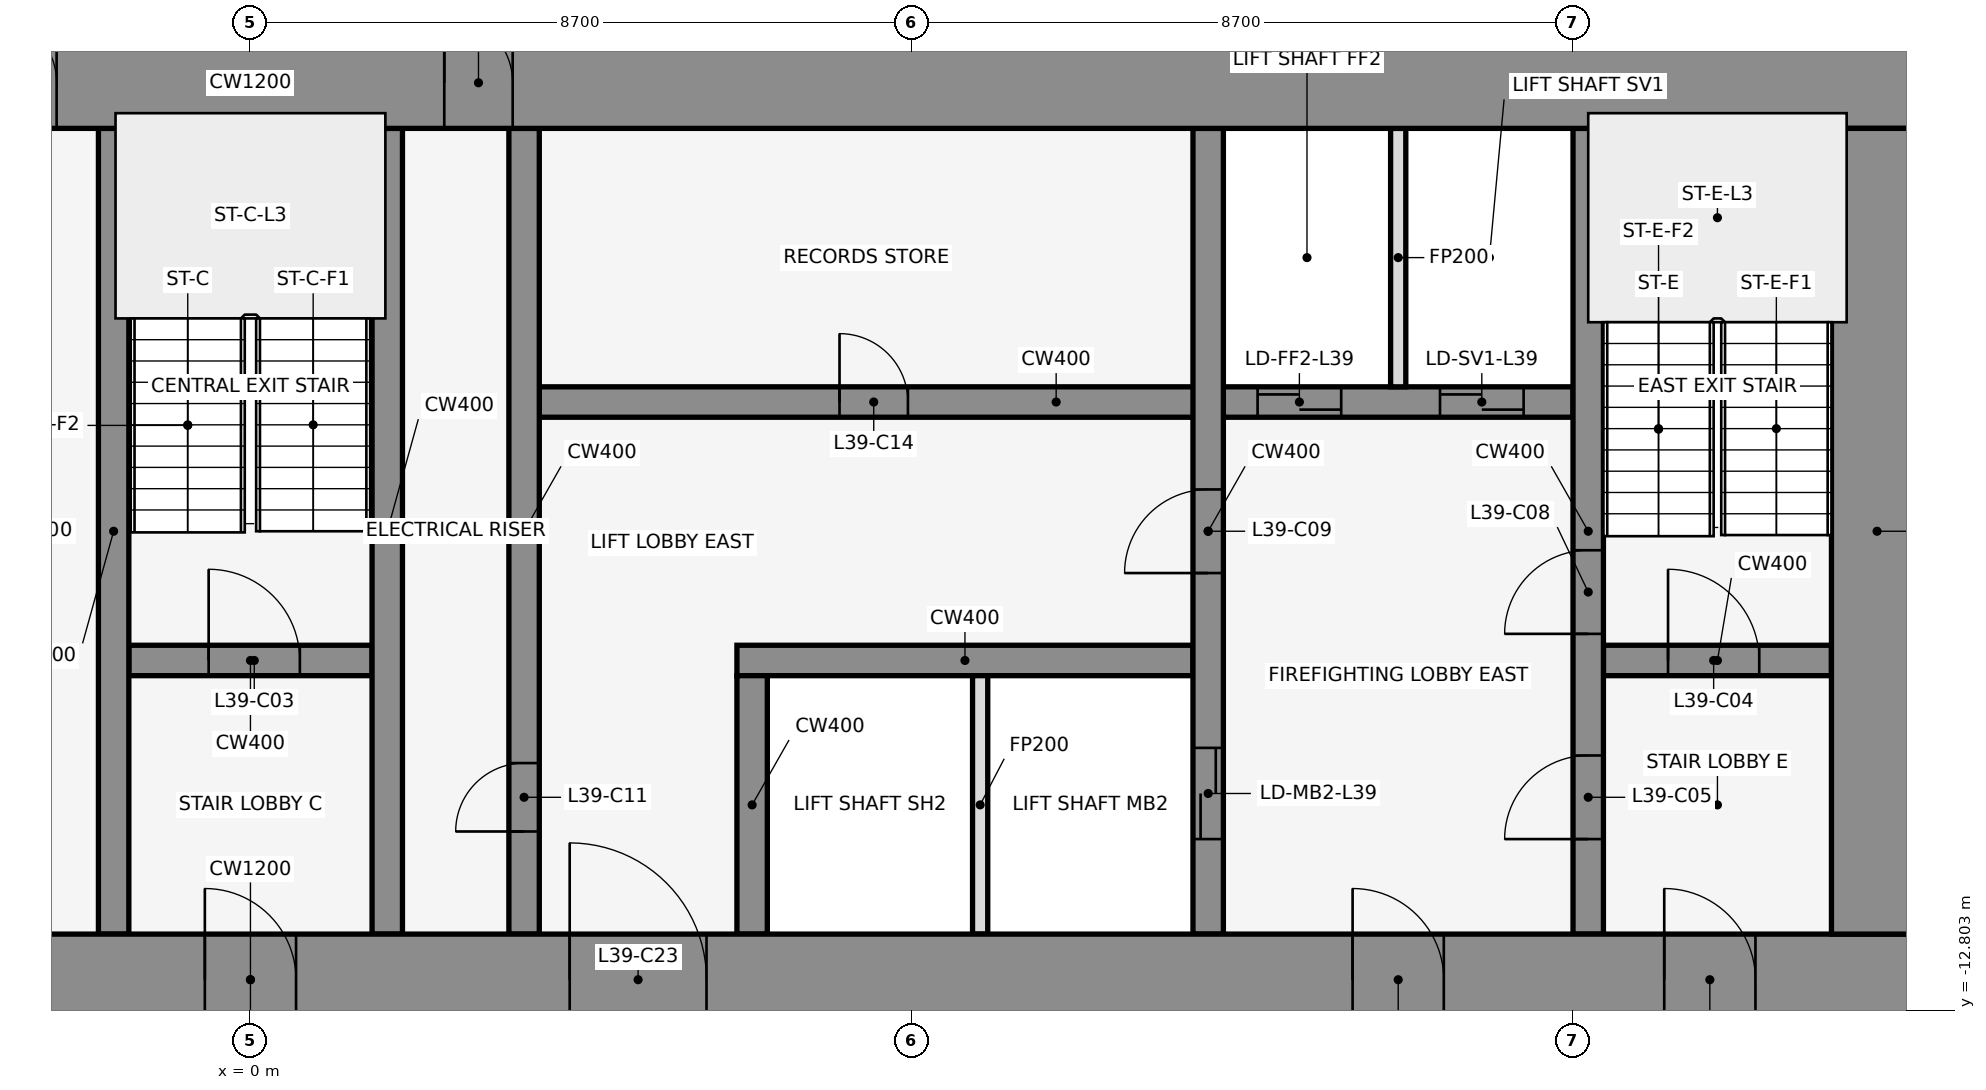
"""IFC4 building model, lengths in metres.
Left out: names, types, materials, properties, quantities, classifications, styles, units other than length and angle.
Written with IfcOpenShell. Run it as: python <this file> out.ifc"""

import sys

from ifc_helpers import new_model, si_unit, direction, frame, frame_2d, origin, place, context, subcontext, project, spatial, rectangle, extrude, element, fill, save


model = new_model("IFC4")
c1 = context("Model", 3, precision=1e-05, world=origin(), true_north=direction((0.0, 1.0)))
c2 = subcontext(c1, "Body", "Model", "MODEL_VIEW")
j1 = project(units=[si_unit("LENGTHUNIT", "METRE"), si_unit("PLANEANGLEUNIT", "RADIAN")], contexts=[c1])
p1 = place(None, origin())
s1 = spatial("IfcSite", under=j1, at=p1, CompositionType="ELEMENT")
p2 = place(p1, origin())
s2 = spatial("IfcBuilding", under=s1, at=p2, CompositionType="ELEMENT")
p3 = place(p2, frame((0.0, 0.0, 177.3)))
s3 = spatial("IfcBuildingStorey", under=s2, at=p3, CompositionType="ELEMENT", Elevation=177.3)
for number, where, z_axis, x_axis in (
    (1, (16.432, -0.105, 0.0), (0.0, 0.0, 1.0), (-0.84, 0.543, 0.0)),
    (2, (1.901, 1.08, 0.0), (0.0, 0.0, 1.0), (-0.84, -0.543, 0.0)),
    (3, (-0.068, -0.105, 0.0), (0.0, 0.0, 1.0), (-0.84, 0.543, 0.0)),
):
    element("IfcWall", number, at=place(p3, frame(where, z_axis=z_axis, x_axis=x_axis)), inside=s3, PredefinedType="STANDARD", context=c2, shape_type="SweptSolid", body=[
        extrude(rectangle(XDim=2.183, YDim=0.25, at=frame_2d((1.091, 0.0))), origin(), (0.0, 0.0, 1.0), 3.95),
    ])
p4 = place(p3, frame((-1.6, -8.2, 0.0), z_axis=(0.0, 0.0, 1.0), x_axis=(1.0, 0.0, 0.0)))
e4 = element("IfcWall", 4, at=p4, inside=s3, PredefinedType="SHEAR", context=c2, shape_type="SweptSolid", body=[
    extrude(rectangle(XDim=3.2, YDim=0.4, at=frame_2d((1.6, 0.0))), origin(), (0.0, 0.0, 1.0), 4.1),
])
p5 = place(p4, frame((1.05, 0.0, 0.0)))
e5 = element("IfcOpeningElement", 5, at=p5, cuts=e4, PredefinedType="OPENING", context=c2, shape_type="SweptSolid", body=[
    extrude(rectangle(XDim=1.2, YDim=2.1, at=frame_2d((0.6, 1.05))), frame((0.0, 0.212, 0.0), z_axis=(0.0, -1.0, 0.0), x_axis=(1.0, 0.0, 0.0)), (0.0, 0.0, 1.0), 0.424),
])
p6 = place(p3, frame((6.4, -8.2, 0.0), z_axis=(0.0, 0.0, 1.0), x_axis=(1.0, 0.0, 0.0)))
e6 = element("IfcWall", 6, at=p6, inside=s3, PredefinedType="SHEAR", context=c2, shape_type="SweptSolid", body=[
    extrude(rectangle(XDim=6.0, YDim=0.4, at=frame_2d((3.0, 0.0))), origin(), (0.0, 0.0, 1.0), 4.1),
])
p7 = place(p3, frame((17.8, -8.2, 0.0), z_axis=(0.0, 0.0, 1.0), x_axis=(1.0, 0.0, 0.0)))
e7 = element("IfcWall", 7, at=p7, inside=s3, PredefinedType="SHEAR", context=c2, shape_type="SweptSolid", body=[
    extrude(rectangle(XDim=3.0, YDim=0.4, at=frame_2d((1.5, 0.0))), origin(), (0.0, 0.0, 1.0), 4.1),
])
p8 = place(p7, frame((0.85, 0.0, 0.0)))
e8 = element("IfcOpeningElement", 8, at=p8, cuts=e7, PredefinedType="OPENING", context=c2, shape_type="SweptSolid", body=[
    extrude(rectangle(XDim=1.2, YDim=2.1, at=frame_2d((0.6, 1.05))), frame((0.0, 0.212, 0.0), z_axis=(0.0, -1.0, 0.0), x_axis=(1.0, 0.0, 0.0)), (0.0, 0.0, 1.0), 0.424),
])
p9 = place(p3, frame((3.8, -4.8, 0.0), z_axis=(0.0, 0.0, 1.0), x_axis=(1.0, 0.0, 0.0)))
e9 = element("IfcWall", 9, at=p9, inside=s3, PredefinedType="SHEAR", context=c2, shape_type="SweptSolid", body=[
    extrude(rectangle(XDim=13.6, YDim=0.4, at=frame_2d((6.8, 0.0))), origin(), (0.0, 0.0, 1.0), 4.1),
])
p10 = place(p9, frame((9.45, 0.0, 0.0)))
e10 = element("IfcOpeningElement", 10, at=p10, cuts=e9, PredefinedType="OPENING", context=c2, shape_type="SweptSolid", body=[
    extrude(rectangle(XDim=1.1, YDim=2.1, at=frame_2d((0.55, 1.05))), frame((0.0, 0.212, 0.0), z_axis=(0.0, -1.0, 0.0), x_axis=(1.0, 0.0, 0.0)), (0.0, 0.0, 1.0), 0.424),
])
p11 = place(p9, frame((11.85, 0.0, 0.0)))
e11 = element("IfcOpeningElement", 11, at=p11, cuts=e9, PredefinedType="OPENING", context=c2, shape_type="SweptSolid", body=[
    extrude(rectangle(XDim=1.1, YDim=2.1, at=frame_2d((0.55, 1.05))), frame((0.0, 0.212, 0.0), z_axis=(0.0, -1.0, 0.0), x_axis=(1.0, 0.0, 0.0)), (0.0, 0.0, 1.0), 0.424),
])
p12 = place(p9, frame((3.95, 0.0, 0.0)))
e12 = element("IfcOpeningElement", 12, at=p12, cuts=e9, PredefinedType="OPENING", context=c2, shape_type="SweptSolid", body=[
    extrude(rectangle(XDim=0.9, YDim=2.1, at=frame_2d((0.45, 1.05))), frame((0.0, 0.212, 0.0), z_axis=(0.0, -1.0, 0.0), x_axis=(1.0, 0.0, 0.0)), (0.0, 0.0, 1.0), 0.424),
])
for number, where, z_axis, x_axis in (
    (13, (-1.8, -11.8, 0.0), (0.0, 0.0, 1.0), (0.0, 1.0, 0.0)),
    (14, (1.8, -11.8, 0.0), (0.0, 0.0, 1.0), (0.0, 1.0, 0.0)),
):
    element("IfcWall", number, at=place(p3, frame(where, z_axis=z_axis, x_axis=x_axis)), inside=s3, PredefinedType="SHEAR", context=c2, shape_type="SweptSolid", body=[
        extrude(rectangle(XDim=10.6, YDim=0.4, at=frame_2d((5.3, 0.0))), origin(), (0.0, 0.0, 1.0), 4.1),
    ])
p13 = place(p3, frame((3.6, -11.8, 0.0), z_axis=(0.0, 0.0, 1.0), x_axis=(0.0, 1.0, 0.0)))
e15 = element("IfcWall", 15, at=p13, inside=s3, PredefinedType="SHEAR", context=c2, shape_type="SweptSolid", body=[
    extrude(rectangle(XDim=10.6, YDim=0.4, at=frame_2d((5.3, 0.0))), origin(), (0.0, 0.0, 1.0), 4.1),
])
p14 = place(p13, frame((1.35, 0.0, 0.0)))
e16 = element("IfcOpeningElement", 16, at=p14, cuts=e15, PredefinedType="OPENING", context=c2, shape_type="SweptSolid", body=[
    extrude(rectangle(XDim=0.9, YDim=2.1, at=frame_2d((0.45, 1.05))), frame((0.0, 0.212, 0.0), z_axis=(0.0, -1.0, 0.0), x_axis=(1.0, 0.0, 0.0)), (0.0, 0.0, 1.0), 0.424),
])
p15 = place(p3, frame((6.6, -11.8, 0.0), z_axis=(0.0, 0.0, 1.0), x_axis=(0.0, 1.0, 0.0)))
e17 = element("IfcWall", 17, at=p15, inside=s3, PredefinedType="SHEAR", context=c2, shape_type="SweptSolid", body=[
    extrude(rectangle(XDim=3.4, YDim=0.4, at=frame_2d((1.7, 0.0))), origin(), (0.0, 0.0, 1.0), 4.1),
])
p16 = place(p3, frame((9.6, -11.8, 0.0), z_axis=(0.0, 0.0, 1.0), x_axis=(0.0, 1.0, 0.0)))
e18 = element("IfcWall", 18, at=p16, inside=s3, PredefinedType="PARTITIONING", context=c2, shape_type="SweptSolid", body=[
    extrude(rectangle(XDim=3.4, YDim=0.2, at=frame_2d((1.7, 0.0))), origin(), (0.0, 0.0, 1.0), 2.84),
])
p17 = place(p3, frame((12.6, -11.8, 0.0), z_axis=(0.0, 0.0, 1.0), x_axis=(0.0, 1.0, 0.0)))
e19 = element("IfcWall", 19, at=p17, inside=s3, PredefinedType="SHEAR", context=c2, shape_type="SweptSolid", body=[
    extrude(rectangle(XDim=10.6, YDim=0.4, at=frame_2d((5.3, 0.0))), origin(), (0.0, 0.0, 1.0), 4.1),
])
p18 = place(p17, frame((1.25, 0.0, 0.0)))
e20 = element("IfcOpeningElement", 20, at=p18, cuts=e19, PredefinedType="OPENING", context=c2, shape_type="SweptSolid", body=[
    extrude(rectangle(XDim=1.2, YDim=2.1, at=frame_2d((0.6, 1.05))), frame((0.0, 0.212, 0.0), z_axis=(0.0, -1.0, 0.0), x_axis=(1.0, 0.0, 0.0)), (0.0, 0.0, 1.0), 0.424),
])
p19 = place(p17, frame((4.75, 0.0, 0.0)))
e21 = element("IfcOpeningElement", 21, at=p19, cuts=e19, PredefinedType="OPENING", context=c2, shape_type="SweptSolid", body=[
    extrude(rectangle(XDim=1.1, YDim=2.1, at=frame_2d((0.55, 1.05))), frame((0.0, 0.212, 0.0), z_axis=(0.0, -1.0, 0.0), x_axis=(1.0, 0.0, 0.0)), (0.0, 0.0, 1.0), 0.424),
])
p20 = place(p3, frame((15.1, -4.6, 0.0), z_axis=(0.0, 0.0, 1.0), x_axis=(0.0, 1.0, 0.0)))
e22 = element("IfcWall", 22, at=p20, inside=s3, PredefinedType="PARTITIONING", context=c2, shape_type="SweptSolid", body=[
    extrude(rectangle(XDim=3.4, YDim=0.2, at=frame_2d((1.7, 0.0))), origin(), (0.0, 0.0, 1.0), 2.84),
])
p21 = place(p3, frame((17.6, -11.8, 0.0), z_axis=(0.0, 0.0, 1.0), x_axis=(0.0, 1.0, 0.0)))
e23 = element("IfcWall", 23, at=p21, inside=s3, PredefinedType="SHEAR", context=c2, shape_type="SweptSolid", body=[
    extrude(rectangle(XDim=10.6, YDim=0.4, at=frame_2d((5.3, 0.0))), origin(), (0.0, 0.0, 1.0), 4.1),
])
p22 = place(p21, frame((1.25, 0.0, 0.0)))
e24 = element("IfcOpeningElement", 24, at=p22, cuts=e23, PredefinedType="OPENING", context=c2, shape_type="SweptSolid", body=[
    extrude(rectangle(XDim=1.1, YDim=2.1, at=frame_2d((0.55, 1.05))), frame((0.0, 0.212, 0.0), z_axis=(0.0, -1.0, 0.0), x_axis=(1.0, 0.0, 0.0)), (0.0, 0.0, 1.0), 0.424),
])
p23 = place(p21, frame((3.95, 0.0, 0.0)))
e25 = element("IfcOpeningElement", 25, at=p23, cuts=e23, PredefinedType="OPENING", context=c2, shape_type="SweptSolid", body=[
    extrude(rectangle(XDim=1.1, YDim=2.1, at=frame_2d((0.55, 1.05))), frame((0.0, 0.212, 0.0), z_axis=(0.0, -1.0, 0.0), x_axis=(1.0, 0.0, 0.0)), (0.0, 0.0, 1.0), 0.424),
])
p24 = place(p3, frame((-22.0, -0.6, 0.0), z_axis=(0.0, 0.0, 1.0), x_axis=(1.0, 0.0, 0.0)))
e26 = element("IfcWall", 26, at=p24, inside=s3, PredefinedType="SHEAR", context=c2, shape_type="SweptSolid", body=[
    extrude(rectangle(XDim=44.0, YDim=1.2, at=frame_2d((22.0, 0.0))), origin(), (0.0, 0.0, 1.0), 4.1),
])
p25 = place(p24, frame((18.55, 0.0, 0.0)))
e27 = element("IfcOpeningElement", 27, at=p25, cuts=e26, PredefinedType="OPENING", context=c2, shape_type="SweptSolid", body=[
    extrude(rectangle(XDim=0.9, YDim=2.1, at=frame_2d((0.45, 1.05))), frame((0.0, 0.612, 0.0), z_axis=(0.0, -1.0, 0.0), x_axis=(1.0, 0.0, 0.0)), (0.0, 0.0, 1.0), 1.224),
])
p26 = place(p24, frame((24.55, 0.0, 0.0)))
e28 = element("IfcOpeningElement", 28, at=p26, cuts=e26, PredefinedType="OPENING", context=c2, shape_type="SweptSolid", body=[
    extrude(rectangle(XDim=0.9, YDim=2.1, at=frame_2d((0.45, 1.05))), frame((0.0, 0.612, 0.0), z_axis=(0.0, -1.0, 0.0), x_axis=(1.0, 0.0, 0.0)), (0.0, 0.0, 1.0), 1.224),
])
p27 = place(p3, frame((-22.0, -12.4, 0.0), z_axis=(0.0, 0.0, 1.0), x_axis=(1.0, 0.0, 0.0)))
e29 = element("IfcWall", 29, at=p27, inside=s3, PredefinedType="SHEAR", context=c2, shape_type="SweptSolid", body=[
    extrude(rectangle(XDim=44.0, YDim=1.2, at=frame_2d((22.0, 0.0))), origin(), (0.0, 0.0, 1.0), 4.1),
])
p28 = place(p27, frame((2.2, 0.0, 0.0)))
e30 = element("IfcOpeningElement", 30, at=p28, cuts=e29, PredefinedType="OPENING", context=c2, shape_type="SweptSolid", body=[
    extrude(rectangle(XDim=1.2, YDim=2.1, at=frame_2d((0.6, 1.05))), frame((0.0, 0.612, 0.0), z_axis=(0.0, -1.0, 0.0), x_axis=(1.0, 0.0, 0.0)), (0.0, 0.0, 1.0), 1.224),
])
p29 = place(p27, frame((21.4, 0.0, 0.0)))
e31 = element("IfcOpeningElement", 31, at=p29, cuts=e29, PredefinedType="OPENING", context=c2, shape_type="SweptSolid", body=[
    extrude(rectangle(XDim=1.2, YDim=2.1, at=frame_2d((0.6, 1.05))), frame((0.0, 0.612, 0.0), z_axis=(0.0, -1.0, 0.0), x_axis=(1.0, 0.0, 0.0)), (0.0, 0.0, 1.0), 1.224),
])
p30 = place(p27, frame((40.6, 0.0, 0.0)))
e32 = element("IfcOpeningElement", 32, at=p30, cuts=e29, PredefinedType="OPENING", context=c2, shape_type="SweptSolid", body=[
    extrude(rectangle(XDim=1.2, YDim=2.1, at=frame_2d((0.6, 1.05))), frame((0.0, 0.612, 0.0), z_axis=(0.0, -1.0, 0.0), x_axis=(1.0, 0.0, 0.0)), (0.0, 0.0, 1.0), 1.224),
])
p31 = place(p27, frame((16.0, 0.0, 0.0)))
e33 = element("IfcOpeningElement", 33, at=p31, cuts=e29, PredefinedType="OPENING", context=c2, shape_type="SweptSolid", body=[
    extrude(rectangle(XDim=1.8, YDim=2.1, at=frame_2d((0.9, 1.05))), frame((0.0, 0.612, 0.0), z_axis=(0.0, -1.0, 0.0), x_axis=(1.0, 0.0, 0.0)), (0.0, 0.0, 1.0), 1.224),
])
p32 = place(p27, frame((6.3, 0.0, 0.0)))
e34 = element("IfcOpeningElement", 34, at=p32, cuts=e29, PredefinedType="OPENING", context=c2, shape_type="SweptSolid", body=[
    extrude(rectangle(XDim=1.2, YDim=2.1, at=frame_2d((0.6, 1.05))), frame((0.0, 0.612, 0.0), z_axis=(0.0, -1.0, 0.0), x_axis=(1.0, 0.0, 0.0)), (0.0, 0.0, 1.0), 1.224),
])
p33 = place(p27, frame((26.2, 0.0, 0.0)))
e35 = element("IfcOpeningElement", 35, at=p33, cuts=e29, PredefinedType="OPENING", context=c2, shape_type="SweptSolid", body=[
    extrude(rectangle(XDim=1.8, YDim=2.1, at=frame_2d((0.9, 1.05))), frame((0.0, 0.612, 0.0), z_axis=(0.0, -1.0, 0.0), x_axis=(1.0, 0.0, 0.0)), (0.0, 0.0, 1.0), 1.224),
])
p34 = place(p27, frame((36.5, 0.0, 0.0)))
e36 = element("IfcOpeningElement", 36, at=p34, cuts=e29, PredefinedType="OPENING", context=c2, shape_type="SweptSolid", body=[
    extrude(rectangle(XDim=1.2, YDim=2.1, at=frame_2d((0.6, 1.05))), frame((0.0, 0.612, 0.0), z_axis=(0.0, -1.0, 0.0), x_axis=(1.0, 0.0, 0.0)), (0.0, 0.0, 1.0), 1.224),
])
p35 = place(p3, frame((21.4, -11.8, 0.0), z_axis=(0.0, 0.0, 1.0), x_axis=(0.0, 1.0, 0.0)))
e37 = element("IfcWall", 37, at=p35, inside=s3, PredefinedType="SHEAR", context=c2, shape_type="SweptSolid", body=[
    extrude(rectangle(XDim=10.6, YDim=1.2, at=frame_2d((5.3, 0.0))), origin(), (0.0, 0.0, 1.0), 4.1),
])
p36 = place(p5, origin())
e38 = element("IfcDoor", 38, at=p36, inside=s3, OperationType="SINGLE_SWING_LEFT", PredefinedType="DOOR", context=c2, shape_type="SweptSolid", body=[
    extrude(rectangle(XDim=1.2, YDim=2.1, at=frame_2d((0.6, 1.05))), frame((0.0, 0.025, 0.0), z_axis=(0.0, -1.0, 0.0), x_axis=(1.0, 0.0, 0.0)), (0.0, 0.0, 1.0), 0.05),
])
fill(e5, e38)
p37 = place(p8, origin())
e39 = element("IfcDoor", 39, at=p37, inside=s3, OperationType="SINGLE_SWING_RIGHT", PredefinedType="DOOR", context=c2, shape_type="SweptSolid", body=[
    extrude(rectangle(XDim=1.2, YDim=2.1, at=frame_2d((0.6, 1.05))), frame((0.0, 0.025, 0.0), z_axis=(0.0, -1.0, 0.0), x_axis=(1.0, 0.0, 0.0)), (0.0, 0.0, 1.0), 0.05),
])
fill(e8, e39)
p38 = place(p22, origin())
e40 = element("IfcDoor", 40, at=p38, inside=s3, OperationType="SINGLE_SWING_LEFT", PredefinedType="DOOR", context=c2, shape_type="SweptSolid", body=[
    extrude(rectangle(XDim=1.1, YDim=2.1, at=frame_2d((0.55, 1.05))), frame((0.0, 0.025, 0.0), z_axis=(0.0, -1.0, 0.0), x_axis=(1.0, 0.0, 0.0)), (0.0, 0.0, 1.0), 0.05),
])
fill(e24, e40)
p39 = place(p18, origin())
e41 = element("IfcDoor", 41, at=p39, inside=s3, OperationType="DOUBLE_DOOR_SLIDING", PredefinedType="DOOR", context=c2, shape_type="SweptSolid", body=[
    extrude(rectangle(XDim=1.2, YDim=2.1, at=frame_2d((0.6, 1.05))), frame((0.0, 0.025, 0.0), z_axis=(0.0, -1.0, 0.0), x_axis=(1.0, 0.0, 0.0)), (0.0, 0.0, 1.0), 0.05),
])
fill(e20, e41)
p40 = place(p10, origin())
e42 = element("IfcDoor", 42, at=p40, inside=s3, OperationType="DOUBLE_DOOR_SLIDING", PredefinedType="DOOR", context=c2, shape_type="SweptSolid", body=[
    extrude(rectangle(XDim=1.1, YDim=2.1, at=frame_2d((0.55, 1.05))), frame((0.0, 0.025, 0.0), z_axis=(0.0, -1.0, 0.0), x_axis=(1.0, 0.0, 0.0)), (0.0, 0.0, 1.0), 0.05),
])
fill(e10, e42)
p41 = place(p11, origin())
e43 = element("IfcDoor", 43, at=p41, inside=s3, OperationType="DOUBLE_DOOR_SLIDING", PredefinedType="DOOR", context=c2, shape_type="SweptSolid", body=[
    extrude(rectangle(XDim=1.1, YDim=2.1, at=frame_2d((0.55, 1.05))), frame((0.0, 0.025, 0.0), z_axis=(0.0, -1.0, 0.0), x_axis=(1.0, 0.0, 0.0)), (0.0, 0.0, 1.0), 0.05),
])
fill(e11, e43)
p42 = place(p23, origin())
e44 = element("IfcDoor", 44, at=p42, inside=s3, OperationType="SINGLE_SWING_RIGHT", PredefinedType="DOOR", context=c2, shape_type="SweptSolid", body=[
    extrude(rectangle(XDim=1.1, YDim=2.1, at=frame_2d((0.55, 1.05))), frame((0.0, 0.025, 0.0), z_axis=(0.0, -1.0, 0.0), x_axis=(1.0, 0.0, 0.0)), (0.0, 0.0, 1.0), 0.05),
])
fill(e25, e44)
p43 = place(p19, frame((1.1, 0.0, 0.0), z_axis=(0.0, 0.0, 1.0), x_axis=(-1.0, 0.0, 0.0)))
e45 = element("IfcDoor", 45, at=p43, inside=s3, OperationType="SINGLE_SWING_RIGHT", PredefinedType="DOOR", context=c2, shape_type="SweptSolid", body=[
    extrude(rectangle(XDim=1.1, YDim=2.1, at=frame_2d((0.55, 1.05))), frame((0.0, 0.025, 0.0), z_axis=(0.0, -1.0, 0.0), x_axis=(1.0, 0.0, 0.0)), (0.0, 0.0, 1.0), 0.05),
])
fill(e21, e45)
p44 = place(p14, origin())
e46 = element("IfcDoor", 46, at=p44, inside=s3, OperationType="SINGLE_SWING_LEFT", PredefinedType="DOOR", context=c2, shape_type="SweptSolid", body=[
    extrude(rectangle(XDim=0.9, YDim=2.1, at=frame_2d((0.45, 1.05))), frame((0.0, 0.025, 0.0), z_axis=(0.0, -1.0, 0.0), x_axis=(1.0, 0.0, 0.0)), (0.0, 0.0, 1.0), 0.05),
])
fill(e16, e46)
p45 = place(p12, origin())
e47 = element("IfcDoor", 47, at=p45, inside=s3, OperationType="SINGLE_SWING_RIGHT", PredefinedType="DOOR", context=c2, shape_type="SweptSolid", body=[
    extrude(rectangle(XDim=0.9, YDim=2.1, at=frame_2d((0.45, 1.05))), frame((0.0, 0.025, 0.0), z_axis=(0.0, -1.0, 0.0), x_axis=(1.0, 0.0, 0.0)), (0.0, 0.0, 1.0), 0.05),
])
fill(e12, e47)
p46 = place(p25, origin())
e48 = element("IfcDoor", 48, at=p46, inside=s3, OperationType="SINGLE_SWING_LEFT", PredefinedType="DOOR", context=c2, shape_type="SweptSolid", body=[
    extrude(rectangle(XDim=0.9, YDim=2.1, at=frame_2d((0.45, 1.05))), frame((0.0, 0.025, 0.0), z_axis=(0.0, -1.0, 0.0), x_axis=(1.0, 0.0, 0.0)), (0.0, 0.0, 1.0), 0.05),
])
fill(e27, e48)
p47 = place(p26, origin())
e49 = element("IfcDoor", 49, at=p47, inside=s3, OperationType="SINGLE_SWING_LEFT", PredefinedType="DOOR", context=c2, shape_type="SweptSolid", body=[
    extrude(rectangle(XDim=0.9, YDim=2.1, at=frame_2d((0.45, 1.05))), frame((0.0, 0.025, 0.0), z_axis=(0.0, -1.0, 0.0), x_axis=(1.0, 0.0, 0.0)), (0.0, 0.0, 1.0), 0.05),
])
fill(e28, e49)
p48 = place(p29, frame((1.2, 0.0, 0.0), z_axis=(0.0, 0.0, 1.0), x_axis=(-1.0, 0.0, 0.0)))
e50 = element("IfcDoor", 50, at=p48, inside=s3, OperationType="SINGLE_SWING_RIGHT", PredefinedType="DOOR", context=c2, shape_type="SweptSolid", body=[
    extrude(rectangle(XDim=1.2, YDim=2.1, at=frame_2d((0.6, 1.05))), frame((0.0, 0.025, 0.0), z_axis=(0.0, -1.0, 0.0), x_axis=(1.0, 0.0, 0.0)), (0.0, 0.0, 1.0), 0.05),
])
fill(e31, e50)
p49 = place(p30, frame((1.2, 0.0, 0.0), z_axis=(0.0, 0.0, 1.0), x_axis=(-1.0, 0.0, 0.0)))
e51 = element("IfcDoor", 51, at=p49, inside=s3, OperationType="SINGLE_SWING_RIGHT", PredefinedType="DOOR", context=c2, shape_type="SweptSolid", body=[
    extrude(rectangle(XDim=1.2, YDim=2.1, at=frame_2d((0.6, 1.05))), frame((0.0, 0.025, 0.0), z_axis=(0.0, -1.0, 0.0), x_axis=(1.0, 0.0, 0.0)), (0.0, 0.0, 1.0), 0.05),
])
fill(e32, e51)
p50 = place(p33, origin())
e52 = element("IfcDoor", 52, at=p50, inside=s3, OperationType="SINGLE_SWING_LEFT", PredefinedType="DOOR", context=c2, shape_type="SweptSolid", body=[
    extrude(rectangle(XDim=1.8, YDim=2.1, at=frame_2d((0.9, 1.05))), frame((0.0, 0.025, 0.0), z_axis=(0.0, -1.0, 0.0), x_axis=(1.0, 0.0, 0.0)), (0.0, 0.0, 1.0), 0.05),
])
fill(e35, e52)
p51 = place(p34, frame((1.2, 0.0, 0.0), z_axis=(0.0, 0.0, 1.0), x_axis=(-1.0, 0.0, 0.0)))
e53 = element("IfcDoor", 53, at=p51, inside=s3, OperationType="SINGLE_SWING_RIGHT", PredefinedType="DOOR", context=c2, shape_type="SweptSolid", body=[
    extrude(rectangle(XDim=1.2, YDim=2.1, at=frame_2d((0.6, 1.05))), frame((0.0, 0.025, 0.0), z_axis=(0.0, -1.0, 0.0), x_axis=(1.0, 0.0, 0.0)), (0.0, 0.0, 1.0), 0.05),
])
fill(e36, e53)
save(model, sys.argv[1])
